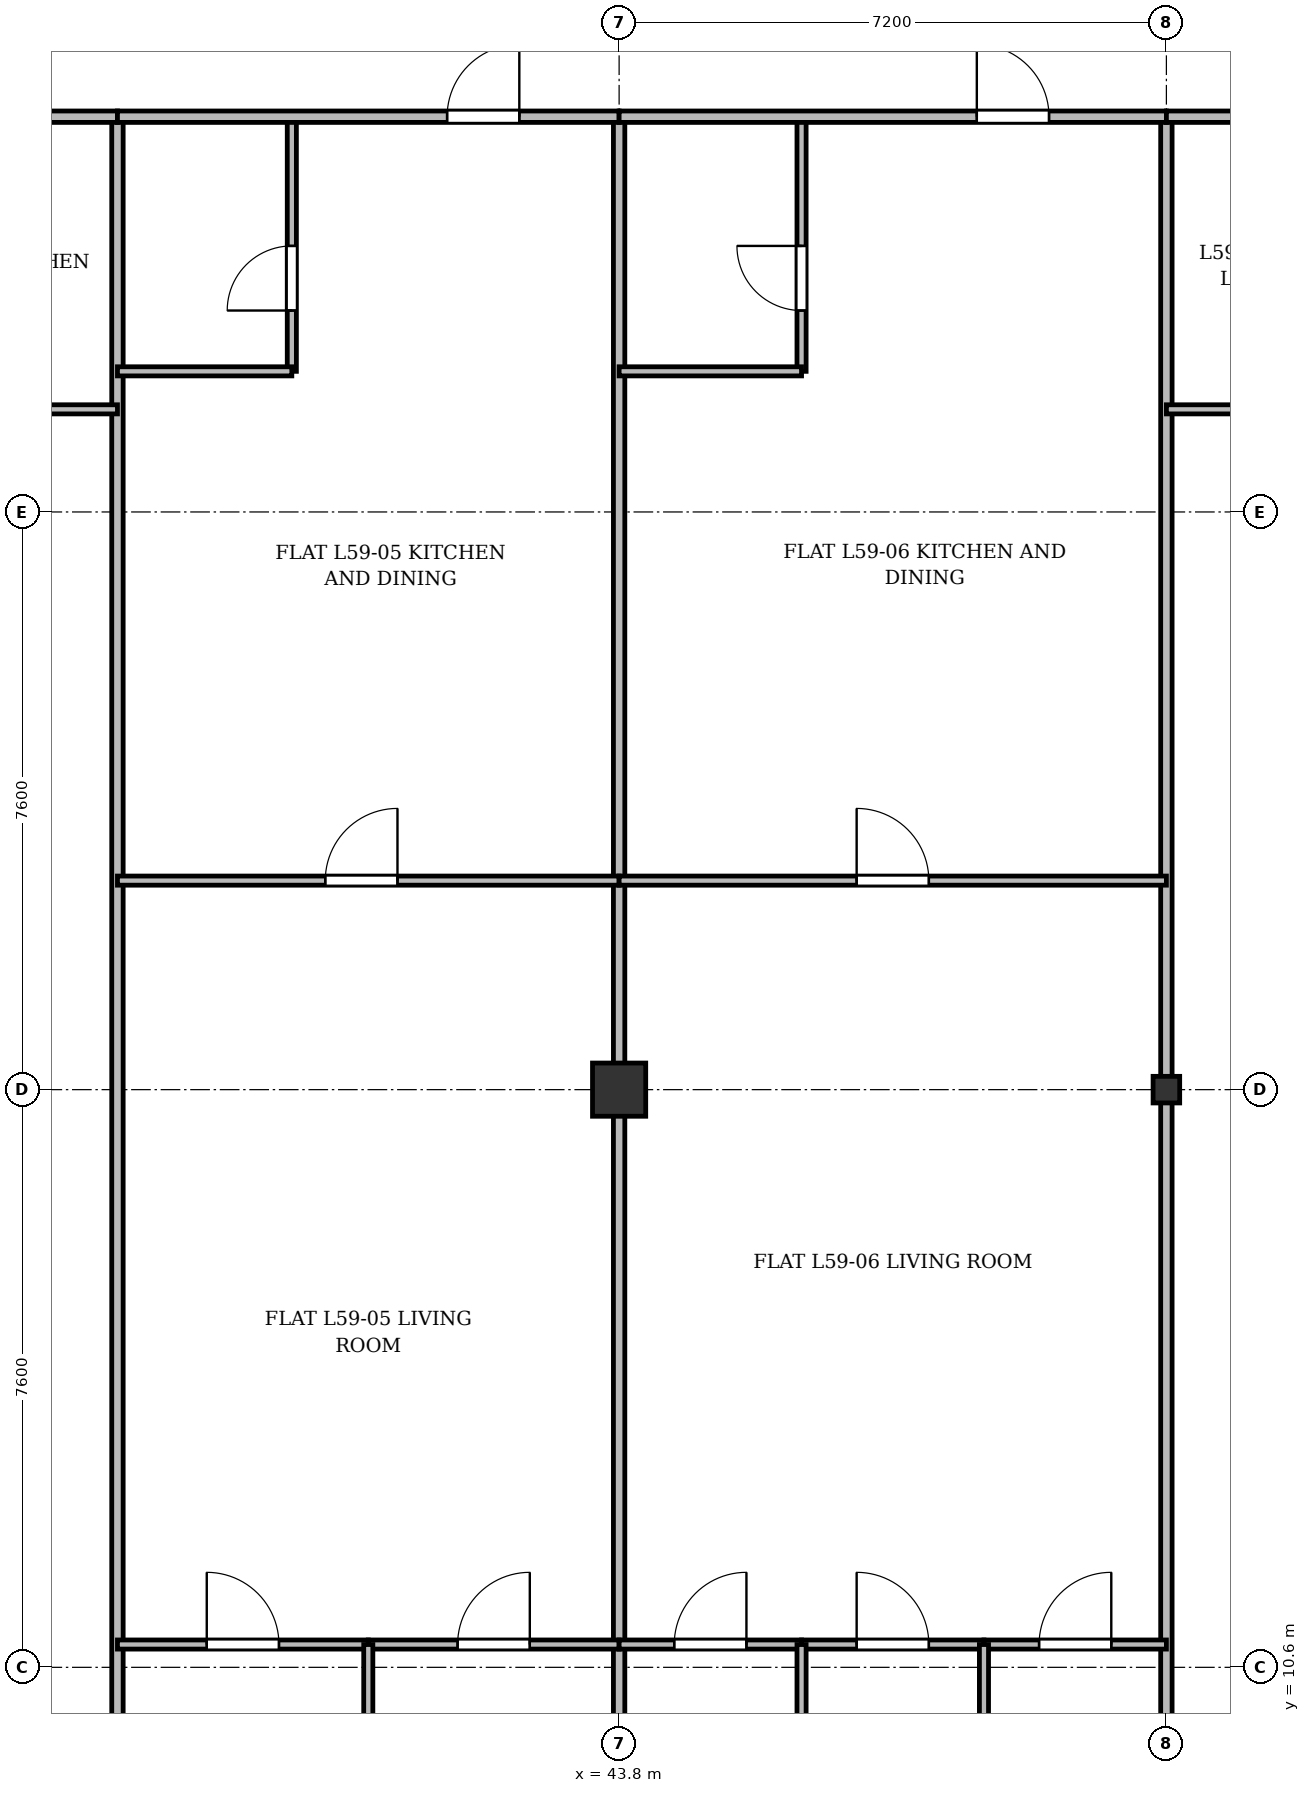
"""IFC4 building model, lengths in metres.
Left out: names, types, materials, properties, quantities, classifications, styles, units other than length and angle.
Written with IfcOpenShell. Run it as: python <this file> out.ifc"""

import sys

from ifc_helpers import new_model, si_unit, direction, frame, frame_2d, origin, origin_2d, place, context, subcontext, project, spatial, rectangle, i_section, extrude, source, transform, mapped, element, fill, save


model = new_model("IFC4")
c1 = context("Model", 3, precision=1e-05, world=origin(), true_north=direction((0.0, 1.0)))
c2 = subcontext(c1, "Body", "Model", "MODEL_VIEW")
j1 = project(units=[si_unit("LENGTHUNIT", "METRE"), si_unit("PLANEANGLEUNIT", "RADIAN")], contexts=[c1])
p1 = place(None, origin())
s1 = spatial("IfcSite", under=j1, at=p1, CompositionType="ELEMENT")
p2 = place(p1, origin())
s2 = spatial("IfcBuilding", under=s1, at=p2, CompositionType="ELEMENT")
p3 = place(p2, frame((0.0, 0.0, 226.5)))
s3 = spatial("IfcBuildingStorey", under=s2, at=p3, CompositionType="ELEMENT", Elevation=226.5)
m1 = source(origin(), c2, "Body", "SweptSolid", [
    extrude(rectangle(XDim=0.7, YDim=0.7, at=origin_2d()), origin(), (0.0, 0.0, 1.0), 3.6),
])
p4 = place(p3, frame((43.8, 18.2, 0.0), z_axis=(0.0, 0.0, 1.0), x_axis=(1.0, 0.0, 0.0)))
e1 = element("IfcColumn", 1, at=p4, inside=s3, PredefinedType="COLUMN", context=c2, shape_type="MappedRepresentation", body=[
    mapped(m1, transform((0.0, 0.0, 0.0), x_axis=(1.0, 0.0, 0.0), y_axis=(0.0, 1.0, 0.0), z_axis=(0.0, 0.0, 1.0), scale=1.0)),
])
m2 = source(origin(), c2, "Body", "SweptSolid", [
    extrude(i_section(OverallWidth=0.35, OverallDepth=0.35, WebThickness=0.018, FlangeThickness=0.028, at=origin_2d()), origin(), (0.0, 0.0, 1.0), 3.6),
])
p5 = place(p3, frame((51.0, 18.2, 0.0), z_axis=(0.0, 0.0, 1.0), x_axis=(1.0, 0.0, 0.0)))
e2 = element("IfcColumn", 2, at=p5, inside=s3, PredefinedType="COLUMN", context=c2, shape_type="MappedRepresentation", body=[
    mapped(m2, transform((0.0, 0.0, 0.0), x_axis=(1.0, 0.0, 0.0), y_axis=(0.0, 1.0, 0.0), z_axis=(0.0, 0.0, 1.0), scale=1.0)),
])
p6 = place(p3, frame((37.2, 3.625, 0.0), z_axis=(0.0, 0.0, 1.0), x_axis=(0.0, 1.0, 0.0)))
e3 = element("IfcWall", 3, at=p6, inside=s3, PredefinedType="PARTITIONING", context=c2, shape_type="SweptSolid", body=[
    extrude(rectangle(XDim=27.375, YDim=0.15, at=frame_2d((13.688, 0.0))), origin(), (0.0, 0.0, 1.0), 2.91),
])
for number, where, z_axis, x_axis in (
    (4, (43.8, 3.625, 0.0), (0.0, 0.0, 1.0), (0.0, 1.0, 0.0)),
    (5, (51.0, 3.625, 0.0), (0.0, 0.0, 1.0), (0.0, 1.0, 0.0)),
):
    element("IfcWall", number, at=place(p3, frame(where, z_axis=z_axis, x_axis=x_axis)), inside=s3, PredefinedType="PARTITIONING", context=c2, shape_type="SweptSolid", body=[
        extrude(rectangle(XDim=27.375, YDim=0.15, at=frame_2d((13.688, 0.0))), origin(), (0.0, 0.0, 1.0), 2.86),
    ])
p7 = place(p3, frame((30.6, 31.0, 0.0), z_axis=(0.0, 0.0, 1.0), x_axis=(1.0, 0.0, 0.0)))
e6 = element("IfcWall", 6, at=p7, inside=s3, PredefinedType="PARTITIONING", context=c2, shape_type="SweptSolid", body=[
    extrude(rectangle(XDim=6.6, YDim=0.15, at=frame_2d((3.3, 0.0))), origin(), (0.0, 0.0, 1.0), 2.86),
])
p8 = place(p7, frame((2.734, 0.0, 0.0)))
e7 = element("IfcOpeningElement", 7, at=p8, cuts=e6, PredefinedType="OPENING", context=c2, shape_type="SweptSolid", body=[
    extrude(rectangle(XDim=0.95, YDim=2.15, at=frame_2d((0.475, 1.075))), frame((0.0, 0.085, 0.0), z_axis=(0.0, -1.0, 0.0), x_axis=(1.0, 0.0, 0.0)), (0.0, 0.0, 1.0), 0.17),
])
p9 = place(p3, frame((30.6, 27.15, 0.0), z_axis=(0.0, 0.0, 1.0), x_axis=(1.0, 0.0, 0.0)))
e8 = element("IfcWall", 8, at=p9, inside=s3, PredefinedType="PARTITIONING", context=c2, shape_type="SweptSolid", body=[
    extrude(rectangle(XDim=6.6, YDim=0.12, at=frame_2d((3.3, 0.0))), origin(), (0.0, 0.0, 1.0), 2.86),
])
p10 = place(p9, frame((2.734, 0.0, 0.0)))
e9 = element("IfcOpeningElement", 9, at=p10, cuts=e8, PredefinedType="OPENING", context=c2, shape_type="SweptSolid", body=[
    extrude(rectangle(XDim=0.95, YDim=2.15, at=frame_2d((0.475, 1.075))), frame((0.0, 0.07, 0.0), z_axis=(0.0, -1.0, 0.0), x_axis=(1.0, 0.0, 0.0)), (0.0, 0.0, 1.0), 0.14),
])
p11 = place(p3, frame((37.2, 20.95, 0.0), z_axis=(0.0, 0.0, 1.0), x_axis=(1.0, 0.0, 0.0)))
e10 = element("IfcWall", 10, at=p11, inside=s3, PredefinedType="PARTITIONING", context=c2, shape_type="SweptSolid", body=[
    extrude(rectangle(XDim=6.6, YDim=0.12, at=frame_2d((3.3, 0.0))), origin(), (0.0, 0.0, 1.0), 2.86),
])
p12 = place(p11, frame((2.734, 0.0, 0.0)))
e11 = element("IfcOpeningElement", 11, at=p12, cuts=e10, PredefinedType="OPENING", context=c2, shape_type="SweptSolid", body=[
    extrude(rectangle(XDim=0.95, YDim=2.15, at=frame_2d((0.475, 1.075))), frame((0.0, 0.07, 0.0), z_axis=(0.0, -1.0, 0.0), x_axis=(1.0, 0.0, 0.0)), (0.0, 0.0, 1.0), 0.14),
])
p13 = place(p3, frame((39.494, 27.65, 0.0), z_axis=(0.0, 0.0, 1.0), x_axis=(0.0, 1.0, 0.0)))
e12 = element("IfcWall", 12, at=p13, inside=s3, PredefinedType="PARTITIONING", context=c2, shape_type="SweptSolid", body=[
    extrude(rectangle(XDim=3.35, YDim=0.12, at=frame_2d((1.675, 0.0))), origin(), (0.0, 0.0, 1.0), 3.36),
])
p14 = place(p13, frame((0.8, 0.0, 0.0)))
e13 = element("IfcOpeningElement", 13, at=p14, cuts=e12, PredefinedType="OPENING", context=c2, shape_type="SweptSolid", body=[
    extrude(rectangle(XDim=0.85, YDim=2.1, at=frame_2d((0.425, 1.05))), frame((0.0, 0.07, 0.0), z_axis=(0.0, -1.0, 0.0), x_axis=(1.0, 0.0, 0.0)), (0.0, 0.0, 1.0), 0.14),
])
p15 = place(p3, frame((37.2, 27.65, 0.0), z_axis=(0.0, 0.0, 1.0), x_axis=(1.0, 0.0, 0.0)))
e14 = element("IfcWall", 14, at=p15, inside=s3, PredefinedType="PARTITIONING", context=c2, shape_type="SweptSolid", body=[
    extrude(rectangle(XDim=2.294, YDim=0.12, at=frame_2d((1.147, 0.0))), origin(), (0.0, 0.0, 1.0), 3.36),
])
p16 = place(p3, frame((37.2, 31.0, 0.0), z_axis=(0.0, 0.0, 1.0), x_axis=(1.0, 0.0, 0.0)))
e15 = element("IfcWall", 15, at=p16, inside=s3, PredefinedType="PARTITIONING", context=c2, shape_type="SweptSolid", body=[
    extrude(rectangle(XDim=6.6, YDim=0.15, at=frame_2d((3.3, 0.0))), origin(), (0.0, 0.0, 1.0), 2.86),
])
p17 = place(p16, frame((4.337, 0.0, 0.0)))
e16 = element("IfcOpeningElement", 16, at=p17, cuts=e15, PredefinedType="OPENING", context=c2, shape_type="SweptSolid", body=[
    extrude(rectangle(XDim=0.95, YDim=2.15, at=frame_2d((0.475, 1.075))), frame((0.0, 0.085, 0.0), z_axis=(0.0, -1.0, 0.0), x_axis=(1.0, 0.0, 0.0)), (0.0, 0.0, 1.0), 0.17),
])
p18 = place(p3, frame((37.2, 10.9, 0.0), z_axis=(0.0, 0.0, 1.0), x_axis=(1.0, 0.0, 0.0)))
e17 = element("IfcWall", 17, at=p18, inside=s3, PredefinedType="PARTITIONING", context=c2, shape_type="SweptSolid", body=[
    extrude(rectangle(XDim=3.3, YDim=0.12, at=frame_2d((1.65, 0.0))), origin(), (0.0, 0.0, 1.0), 3.06),
])
p19 = place(p18, frame((1.175, 0.0, 0.0)))
e18 = element("IfcOpeningElement", 18, at=p19, cuts=e17, PredefinedType="OPENING", context=c2, shape_type="SweptSolid", body=[
    extrude(rectangle(XDim=0.95, YDim=2.15, at=frame_2d((0.475, 1.075))), frame((0.0, 0.07, 0.0), z_axis=(0.0, -1.0, 0.0), x_axis=(1.0, 0.0, 0.0)), (0.0, 0.0, 1.0), 0.14),
])
p20 = place(p3, frame((40.5, 10.9, 0.0), z_axis=(0.0, 0.0, 1.0), x_axis=(1.0, 0.0, 0.0)))
e19 = element("IfcWall", 19, at=p20, inside=s3, PredefinedType="PARTITIONING", context=c2, shape_type="SweptSolid", body=[
    extrude(rectangle(XDim=3.3, YDim=0.12, at=frame_2d((1.65, 0.0))), origin(), (0.0, 0.0, 1.0), 2.86),
])
p21 = place(p20, frame((1.175, 0.0, 0.0)))
e20 = element("IfcOpeningElement", 20, at=p21, cuts=e19, PredefinedType="OPENING", context=c2, shape_type="SweptSolid", body=[
    extrude(rectangle(XDim=0.95, YDim=2.15, at=frame_2d((0.475, 1.075))), frame((0.0, 0.07, 0.0), z_axis=(0.0, -1.0, 0.0), x_axis=(1.0, 0.0, 0.0)), (0.0, 0.0, 1.0), 0.14),
])
p22 = place(p3, frame((40.5, 3.625, 0.0), z_axis=(0.0, 0.0, 1.0), x_axis=(0.0, 1.0, 0.0)))
e21 = element("IfcWall", 21, at=p22, inside=s3, PredefinedType="PARTITIONING", context=c2, shape_type="SweptSolid", body=[
    extrude(rectangle(XDim=7.275, YDim=0.12, at=frame_2d((3.637, 0.0))), origin(), (0.0, 0.0, 1.0), 2.91),
])
p23 = place(p3, frame((43.8, 20.95, 0.0), z_axis=(0.0, 0.0, 1.0), x_axis=(1.0, 0.0, 0.0)))
e22 = element("IfcWall", 22, at=p23, inside=s3, PredefinedType="PARTITIONING", context=c2, shape_type="SweptSolid", body=[
    extrude(rectangle(XDim=7.2, YDim=0.12, at=frame_2d((3.6, 0.0))), origin(), (0.0, 0.0, 1.0), 2.86),
])
p24 = place(p23, frame((3.125, 0.0, 0.0)))
e23 = element("IfcOpeningElement", 23, at=p24, cuts=e22, PredefinedType="OPENING", context=c2, shape_type="SweptSolid", body=[
    extrude(rectangle(XDim=0.95, YDim=2.15, at=frame_2d((0.475, 1.075))), frame((0.0, 0.07, 0.0), z_axis=(0.0, -1.0, 0.0), x_axis=(1.0, 0.0, 0.0)), (0.0, 0.0, 1.0), 0.14),
])
p25 = place(p3, frame((46.2, 27.65, 0.0), z_axis=(0.0, 0.0, 1.0), x_axis=(0.0, 1.0, 0.0)))
e24 = element("IfcWall", 24, at=p25, inside=s3, PredefinedType="PARTITIONING", context=c2, shape_type="SweptSolid", body=[
    extrude(rectangle(XDim=3.35, YDim=0.12, at=frame_2d((1.675, 0.0))), origin(), (0.0, 0.0, 1.0), 3.36),
])
p26 = place(p25, frame((0.8, 0.0, 0.0)))
e25 = element("IfcOpeningElement", 25, at=p26, cuts=e24, PredefinedType="OPENING", context=c2, shape_type="SweptSolid", body=[
    extrude(rectangle(XDim=0.85, YDim=2.1, at=frame_2d((0.425, 1.05))), frame((0.0, 0.07, 0.0), z_axis=(0.0, -1.0, 0.0), x_axis=(1.0, 0.0, 0.0)), (0.0, 0.0, 1.0), 0.14),
])
p27 = place(p3, frame((43.8, 27.65, 0.0), z_axis=(0.0, 0.0, 1.0), x_axis=(1.0, 0.0, 0.0)))
e26 = element("IfcWall", 26, at=p27, inside=s3, PredefinedType="PARTITIONING", context=c2, shape_type="SweptSolid", body=[
    extrude(rectangle(XDim=2.4, YDim=0.12, at=frame_2d((1.2, 0.0))), origin(), (0.0, 0.0, 1.0), 2.86),
])
p28 = place(p3, frame((43.8, 31.0, 0.0), z_axis=(0.0, 0.0, 1.0), x_axis=(1.0, 0.0, 0.0)))
e27 = element("IfcWall", 27, at=p28, inside=s3, PredefinedType="PARTITIONING", context=c2, shape_type="SweptSolid", body=[
    extrude(rectangle(XDim=7.2, YDim=0.15, at=frame_2d((3.6, 0.0))), origin(), (0.0, 0.0, 1.0), 2.86),
])
p29 = place(p28, frame((4.706, 0.0, 0.0)))
e28 = element("IfcOpeningElement", 28, at=p29, cuts=e27, PredefinedType="OPENING", context=c2, shape_type="SweptSolid", body=[
    extrude(rectangle(XDim=0.95, YDim=2.15, at=frame_2d((0.475, 1.075))), frame((0.0, 0.085, 0.0), z_axis=(0.0, -1.0, 0.0), x_axis=(1.0, 0.0, 0.0)), (0.0, 0.0, 1.0), 0.17),
])
p30 = place(p3, frame((43.8, 10.9, 0.0), z_axis=(0.0, 0.0, 1.0), x_axis=(1.0, 0.0, 0.0)))
e29 = element("IfcWall", 29, at=p30, inside=s3, PredefinedType="PARTITIONING", context=c2, shape_type="SweptSolid", body=[
    extrude(rectangle(XDim=2.4, YDim=0.12, at=frame_2d((1.2, 0.0))), origin(), (0.0, 0.0, 1.0), 2.86),
])
p31 = place(p30, frame((0.725, 0.0, 0.0)))
e30 = element("IfcOpeningElement", 30, at=p31, cuts=e29, PredefinedType="OPENING", context=c2, shape_type="SweptSolid", body=[
    extrude(rectangle(XDim=0.95, YDim=2.15, at=frame_2d((0.475, 1.075))), frame((0.0, 0.07, 0.0), z_axis=(0.0, -1.0, 0.0), x_axis=(1.0, 0.0, 0.0)), (0.0, 0.0, 1.0), 0.14),
])
p32 = place(p3, frame((46.2, 10.9, 0.0), z_axis=(0.0, 0.0, 1.0), x_axis=(1.0, 0.0, 0.0)))
e31 = element("IfcWall", 31, at=p32, inside=s3, PredefinedType="PARTITIONING", context=c2, shape_type="SweptSolid", body=[
    extrude(rectangle(XDim=2.4, YDim=0.12, at=frame_2d((1.2, 0.0))), origin(), (0.0, 0.0, 1.0), 3.06),
])
p33 = place(p32, frame((0.725, 0.0, 0.0)))
e32 = element("IfcOpeningElement", 32, at=p33, cuts=e31, PredefinedType="OPENING", context=c2, shape_type="SweptSolid", body=[
    extrude(rectangle(XDim=0.95, YDim=2.15, at=frame_2d((0.475, 1.075))), frame((0.0, 0.07, 0.0), z_axis=(0.0, -1.0, 0.0), x_axis=(1.0, 0.0, 0.0)), (0.0, 0.0, 1.0), 0.14),
])
p34 = place(p3, frame((46.2, 3.625, 0.0), z_axis=(0.0, 0.0, 1.0), x_axis=(0.0, 1.0, 0.0)))
e33 = element("IfcWall", 33, at=p34, inside=s3, PredefinedType="PARTITIONING", context=c2, shape_type="SweptSolid", body=[
    extrude(rectangle(XDim=7.275, YDim=0.12, at=frame_2d((3.637, 0.0))), origin(), (0.0, 0.0, 1.0), 2.91),
])
p35 = place(p3, frame((48.6, 10.9, 0.0), z_axis=(0.0, 0.0, 1.0), x_axis=(1.0, 0.0, 0.0)))
e34 = element("IfcWall", 34, at=p35, inside=s3, PredefinedType="PARTITIONING", context=c2, shape_type="SweptSolid", body=[
    extrude(rectangle(XDim=2.4, YDim=0.12, at=frame_2d((1.2, 0.0))), origin(), (0.0, 0.0, 1.0), 2.86),
])
p36 = place(p35, frame((0.725, 0.0, 0.0)))
e35 = element("IfcOpeningElement", 35, at=p36, cuts=e34, PredefinedType="OPENING", context=c2, shape_type="SweptSolid", body=[
    extrude(rectangle(XDim=0.95, YDim=2.15, at=frame_2d((0.475, 1.075))), frame((0.0, 0.07, 0.0), z_axis=(0.0, -1.0, 0.0), x_axis=(1.0, 0.0, 0.0)), (0.0, 0.0, 1.0), 0.14),
])
p37 = place(p3, frame((48.6, 3.625, 0.0), z_axis=(0.0, 0.0, 1.0), x_axis=(0.0, 1.0, 0.0)))
e36 = element("IfcWall", 36, at=p37, inside=s3, PredefinedType="PARTITIONING", context=c2, shape_type="SweptSolid", body=[
    extrude(rectangle(XDim=7.275, YDim=0.12, at=frame_2d((3.637, 0.0))), origin(), (0.0, 0.0, 1.0), 2.91),
])
p38 = place(p3, frame((51.0, 31.0, 0.0), z_axis=(0.0, 0.0, 1.0), x_axis=(1.0, 0.0, 0.0)))
e37 = element("IfcWall", 37, at=p38, inside=s3, PredefinedType="PARTITIONING", context=c2, shape_type="SweptSolid", body=[
    extrude(rectangle(XDim=7.8, YDim=0.15, at=frame_2d((3.9, 0.0))), origin(), (0.0, 0.0, 1.0), 2.86),
])
p39 = place(p38, frame((3.333, 0.0, 0.0)))
e38 = element("IfcOpeningElement", 38, at=p39, cuts=e37, PredefinedType="OPENING", context=c2, shape_type="SweptSolid", body=[
    extrude(rectangle(XDim=0.95, YDim=2.15, at=frame_2d((0.475, 1.075))), frame((0.0, 0.085, 0.0), z_axis=(0.0, -1.0, 0.0), x_axis=(1.0, 0.0, 0.0)), (0.0, 0.0, 1.0), 0.17),
])
p40 = place(p3, frame((51.0, 27.15, 0.0), z_axis=(0.0, 0.0, 1.0), x_axis=(1.0, 0.0, 0.0)))
e39 = element("IfcWall", 39, at=p40, inside=s3, PredefinedType="PARTITIONING", context=c2, shape_type="SweptSolid", body=[
    extrude(rectangle(XDim=7.8, YDim=0.12, at=frame_2d((3.9, 0.0))), origin(), (0.0, 0.0, 1.0), 2.86),
])
p41 = place(p40, frame((3.333, 0.0, 0.0)))
e40 = element("IfcOpeningElement", 40, at=p41, cuts=e39, PredefinedType="OPENING", context=c2, shape_type="SweptSolid", body=[
    extrude(rectangle(XDim=0.95, YDim=2.15, at=frame_2d((0.475, 1.075))), frame((0.0, 0.07, 0.0), z_axis=(0.0, -1.0, 0.0), x_axis=(1.0, 0.0, 0.0)), (0.0, 0.0, 1.0), 0.14),
])
m3 = source(origin(), c2, "Body", "SweptSolid", [
    extrude(rectangle(XDim=0.95, YDim=2.15, at=frame_2d((0.475, 1.075))), frame((0.0, 0.025, 0.0), z_axis=(0.0, -1.0, 0.0), x_axis=(1.0, 0.0, 0.0)), (0.0, 0.0, 1.0), 0.05),
])
p42 = place(p12, origin())
e41 = element("IfcDoor", 41, at=p42, inside=s3, OperationType="SINGLE_SWING_RIGHT", PredefinedType="DOOR", context=c2, shape_type="MappedRepresentation", body=[
    mapped(m3, transform((0.0, 0.0, 0.0), x_axis=(1.0, 0.0, 0.0), y_axis=(0.0, 1.0, 0.0), z_axis=(0.0, 0.0, 1.0), scale=1.0)),
])
fill(e11, e41)
m4 = source(origin(), c2, "Body", "SweptSolid", [
    extrude(rectangle(XDim=0.85, YDim=2.1, at=frame_2d((0.425, 1.05))), frame((0.0, 0.025, 0.0), z_axis=(0.0, -1.0, 0.0), x_axis=(1.0, 0.0, 0.0)), (0.0, 0.0, 1.0), 0.05),
])
p43 = place(p14, origin())
e42 = element("IfcDoor", 42, at=p43, inside=s3, OperationType="SINGLE_SWING_LEFT", PredefinedType="DOOR", context=c2, shape_type="MappedRepresentation", body=[
    mapped(m4, transform((0.0, 0.0, 0.0), x_axis=(1.0, 0.0, 0.0), y_axis=(0.0, 1.0, 0.0), z_axis=(0.0, 0.0, 1.0), scale=1.0)),
])
fill(e13, e42)
p44 = place(p17, origin())
e43 = element("IfcDoor", 43, at=p44, inside=s3, OperationType="SINGLE_SWING_RIGHT", PredefinedType="DOOR", context=c2, shape_type="MappedRepresentation", body=[
    mapped(m3, transform((0.0, 0.0, 0.0), x_axis=(1.0, 0.0, 0.0), y_axis=(0.0, 1.0, 0.0), z_axis=(0.0, 0.0, 1.0), scale=1.0)),
])
fill(e16, e43)
p45 = place(p19, origin())
e44 = element("IfcDoor", 44, at=p45, inside=s3, OperationType="SINGLE_SWING_LEFT", PredefinedType="DOOR", context=c2, shape_type="MappedRepresentation", body=[
    mapped(m3, transform((0.0, 0.0, 0.0), x_axis=(1.0, 0.0, 0.0), y_axis=(0.0, 1.0, 0.0), z_axis=(0.0, 0.0, 1.0), scale=1.0)),
])
fill(e18, e44)
p46 = place(p21, origin())
e45 = element("IfcDoor", 45, at=p46, inside=s3, OperationType="SINGLE_SWING_RIGHT", PredefinedType="DOOR", context=c2, shape_type="MappedRepresentation", body=[
    mapped(m3, transform((0.0, 0.0, 0.0), x_axis=(1.0, 0.0, 0.0), y_axis=(0.0, 1.0, 0.0), z_axis=(0.0, 0.0, 1.0), scale=1.0)),
])
fill(e20, e45)
p47 = place(p24, origin())
e46 = element("IfcDoor", 46, at=p47, inside=s3, OperationType="SINGLE_SWING_LEFT", PredefinedType="DOOR", context=c2, shape_type="MappedRepresentation", body=[
    mapped(m3, transform((0.0, 0.0, 0.0), x_axis=(1.0, 0.0, 0.0), y_axis=(0.0, 1.0, 0.0), z_axis=(0.0, 0.0, 1.0), scale=1.0)),
])
fill(e23, e46)
p48 = place(p26, origin())
e47 = element("IfcDoor", 47, at=p48, inside=s3, OperationType="SINGLE_SWING_RIGHT", PredefinedType="DOOR", context=c2, shape_type="MappedRepresentation", body=[
    mapped(m4, transform((0.0, 0.0, 0.0), x_axis=(1.0, 0.0, 0.0), y_axis=(0.0, 1.0, 0.0), z_axis=(0.0, 0.0, 1.0), scale=1.0)),
])
fill(e25, e47)
p49 = place(p29, origin())
e48 = element("IfcDoor", 48, at=p49, inside=s3, OperationType="SINGLE_SWING_LEFT", PredefinedType="DOOR", context=c2, shape_type="MappedRepresentation", body=[
    mapped(m3, transform((0.0, 0.0, 0.0), x_axis=(1.0, 0.0, 0.0), y_axis=(0.0, 1.0, 0.0), z_axis=(0.0, 0.0, 1.0), scale=1.0)),
])
fill(e28, e48)
p50 = place(p31, origin())
e49 = element("IfcDoor", 49, at=p50, inside=s3, OperationType="SINGLE_SWING_RIGHT", PredefinedType="DOOR", context=c2, shape_type="MappedRepresentation", body=[
    mapped(m3, transform((0.0, 0.0, 0.0), x_axis=(1.0, 0.0, 0.0), y_axis=(0.0, 1.0, 0.0), z_axis=(0.0, 0.0, 1.0), scale=1.0)),
])
fill(e30, e49)
p51 = place(p33, origin())
e50 = element("IfcDoor", 50, at=p51, inside=s3, OperationType="SINGLE_SWING_LEFT", PredefinedType="DOOR", context=c2, shape_type="MappedRepresentation", body=[
    mapped(m3, transform((0.0, 0.0, 0.0), x_axis=(1.0, 0.0, 0.0), y_axis=(0.0, 1.0, 0.0), z_axis=(0.0, 0.0, 1.0), scale=1.0)),
])
fill(e32, e50)
p52 = place(p36, origin())
e51 = element("IfcDoor", 51, at=p52, inside=s3, OperationType="SINGLE_SWING_RIGHT", PredefinedType="DOOR", context=c2, shape_type="MappedRepresentation", body=[
    mapped(m3, transform((0.0, 0.0, 0.0), x_axis=(1.0, 0.0, 0.0), y_axis=(0.0, 1.0, 0.0), z_axis=(0.0, 0.0, 1.0), scale=1.0)),
])
fill(e35, e51)
save(model, sys.argv[1])
